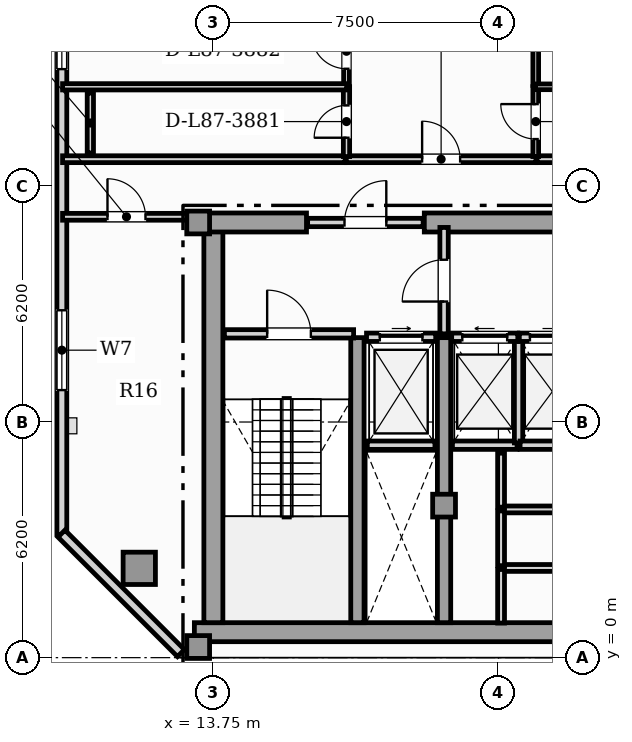
"""IFC4 building model, lengths in metres.
Left out: names, types, materials, properties, quantities, classifications, styles, units other than length and angle.
Written with IfcOpenShell. Run it as: python <this file> out.ifc"""

import sys

from ifc_helpers import new_model, si_unit, direction, frame, frame_2d, origin, origin_2d, place, context, subcontext, project, spatial, rectangle, hollow_rectangle, extrude, element, fill, save


model = new_model("IFC4")
c1 = context("Model", 3, precision=1e-05, world=origin(), true_north=direction((0.0, 1.0)))
c2 = subcontext(c1, "Body", "Model", "MODEL_VIEW")
j1 = project(units=[si_unit("LENGTHUNIT", "METRE"), si_unit("PLANEANGLEUNIT", "RADIAN")], contexts=[c1])
p1 = place(None, origin())
s1 = spatial("IfcSite", under=j1, at=p1, CompositionType="ELEMENT")
p2 = place(p1, origin())
s2 = spatial("IfcBuilding", under=s1, at=p2, CompositionType="ELEMENT")
p3 = place(p2, frame((0.0, 0.0, 353.45)))
s3 = spatial("IfcBuildingStorey", under=s2, at=p3, CompositionType="ELEMENT", Elevation=353.45)
p4 = place(p3, frame((13.25, 0.67, 0.0), z_axis=(0.0, 0.0, 1.0), x_axis=(1.0, 0.0, 0.0)))
e1 = element("IfcWall", 1, at=p4, inside=s3, PredefinedType="SHEAR", context=c2, shape_type="SweptSolid", body=[
    extrude(rectangle(XDim=31.0, YDim=0.5, at=frame_2d((15.5, 0.0))), origin(), (0.0, 0.0, 1.0), 4.14),
])
p5 = place(p3, frame((13.75, 0.92, 0.0), z_axis=(0.0, 0.0, 1.0), x_axis=(0.0, 1.0, 0.0)))
e2 = element("IfcWall", 2, at=p5, inside=s3, PredefinedType="SHEAR", context=c2, shape_type="SweptSolid", body=[
    extrude(rectangle(XDim=10.53, YDim=0.5, at=frame_2d((5.265, 0.0))), origin(), (0.0, 0.0, 1.0), 4.14),
])
p6 = place(p3, frame((13.25, 11.45, 0.0), z_axis=(0.0, 0.0, 1.0), x_axis=(1.0, 0.0, 0.0)))
e3 = element("IfcWall", 3, at=p6, inside=s3, PredefinedType="SHEAR", context=c2, shape_type="SweptSolid", body=[
    extrude(rectangle(XDim=2.95, YDim=0.5, at=frame_2d((1.475, 0.0))), origin(), (0.0, 0.0, 1.0), 4.14),
])
p7 = place(p3, frame((19.3, 11.45, 0.0), z_axis=(0.0, 0.0, 1.0), x_axis=(1.0, 0.0, 0.0)))
e4 = element("IfcWall", 4, at=p7, inside=s3, PredefinedType="SHEAR", context=c2, shape_type="SweptSolid", body=[
    extrude(rectangle(XDim=7.3, YDim=0.5, at=frame_2d((3.65, 0.0))), origin(), (0.0, 0.0, 1.0), 4.14),
])
for number, where, z_axis, x_axis in (
    (5, (17.54, 0.92, 0.0), (0.0, 0.0, 1.0), (0.0, 1.0, 0.0)),
    (6, (19.82, 0.92, 0.0), (0.0, 0.0, 1.0), (0.0, 1.0, 0.0)),
):
    element("IfcWall", number, at=place(p3, frame(where, z_axis=z_axis, x_axis=x_axis)), inside=s3, PredefinedType="SHEAR", context=c2, shape_type="SweptSolid", body=[
        extrude(rectangle(XDim=7.5, YDim=0.35, at=frame_2d((3.75, 0.0))), origin(), (0.0, 0.0, 1.0), 4.14),
    ])
for number, where, z_axis, x_axis in (
    (7, (13.35, 0.28, 0.0), (0.0, 0.0, 1.0), (1.0, 0.0, 0.0)),
    (8, (13.35, 11.45, 0.0), (0.0, 0.0, 1.0), (1.0, 0.0, 0.0)),
    (9, (19.82, 4.0, 0.0), (0.0, 0.0, 1.0), (1.0, 0.0, 0.0)),
):
    element("IfcColumn", number, at=place(p3, frame(where, z_axis=z_axis, x_axis=x_axis)), inside=s3, PredefinedType="COLUMN", context=c2, shape_type="SweptSolid", body=[
        extrude(rectangle(XDim=0.6, YDim=0.6, at=origin_2d()), origin(), (0.0, 0.0, 1.0), 4.4),
    ])
p8 = place(p3, frame((11.8, 2.35, 0.0), z_axis=(0.0, 0.0, 1.0), x_axis=(1.0, 0.0, 0.0)))
e10 = element("IfcColumn", 10, at=p8, inside=s3, PredefinedType="USERDEFINED", context=c2, shape_type="SweptSolid", body=[
    extrude(hollow_rectangle(XDim=0.85, YDim=0.85, WallThickness=0.05, at=origin_2d()), origin(), (0.0, 0.0, 1.0), 4.4),
])
p9 = place(p3, frame((9.763, 27.791, 0.0), z_axis=(0.0, 0.0, 1.0), x_axis=(0.0, -1.0, 0.0)))
e11 = element("IfcWall", 11, at=p9, inside=s3, PredefinedType="SOLIDWALL", context=c2, shape_type="SweptSolid", body=[
    extrude(rectangle(XDim=24.551, YDim=0.26, at=frame_2d((12.276, 0.0))), origin(), (0.0, 0.0, 1.0), 4.14),
])
p10 = place(p9, frame((18.651, 0.0, 0.85)))
e12 = element("IfcOpeningElement", 12, at=p10, cuts=e11, PredefinedType="OPENING", context=c2, shape_type="SweptSolid", body=[
    extrude(rectangle(XDim=2.1, YDim=2.05, at=frame_2d((1.05, 1.025))), frame((0.0, 0.14, 0.0), z_axis=(0.0, -1.0, 0.0), x_axis=(1.0, 0.0, 0.0)), (0.0, 0.0, 1.0), 0.28),
])
p11 = place(p9, frame((2.83, 0.0, 0.95)))
e13 = element("IfcOpeningElement", 13, at=p11, cuts=e11, PredefinedType="OPENING", context=c2, shape_type="SweptSolid", body=[
    extrude(rectangle(XDim=0.9, YDim=1.5, at=frame_2d((0.45, 0.75))), frame((0.0, 0.14, 0.0), z_axis=(0.0, -1.0, 0.0), x_axis=(1.0, 0.0, 0.0)), (0.0, 0.0, 1.0), 0.28),
])
p12 = place(p9, frame((11.406, 0.0, 0.95)))
e14 = element("IfcOpeningElement", 14, at=p12, cuts=e11, PredefinedType="OPENING", context=c2, shape_type="SweptSolid", body=[
    extrude(rectangle(XDim=0.9, YDim=1.5, at=frame_2d((0.45, 0.75))), frame((0.0, 0.14, 0.0), z_axis=(0.0, -1.0, 0.0), x_axis=(1.0, 0.0, 0.0)), (0.0, 0.0, 1.0), 0.28),
])
p13 = place(p9, frame((6.661, 0.0, 0.88)))
e15 = element("IfcOpeningElement", 15, at=p13, cuts=e11, PredefinedType="OPENING", context=c2, shape_type="SweptSolid", body=[
    extrude(rectangle(XDim=1.65, YDim=2.0, at=frame_2d((0.825, 1.0))), frame((0.0, 0.14, 0.0), z_axis=(0.0, -1.0, 0.0), x_axis=(1.0, 0.0, 0.0)), (0.0, 0.0, 1.0), 0.28),
])
p14 = place(p3, frame((9.753, 3.264, 0.0), z_axis=(0.0, 0.0, 1.0), x_axis=(0.707106781187, -0.707106781187, 0.0)))
e16 = element("IfcWall", 16, at=p14, inside=s3, PredefinedType="SOLIDWALL", context=c2, shape_type="SweptSolid", body=[
    extrude(rectangle(XDim=4.446, YDim=0.26, at=frame_2d((2.223, 0.0))), origin(), (0.0, 0.0, 1.0), 4.14),
])
p15 = place(p3, frame((17.8, 5.59, 0.0), z_axis=(0.0, 0.0, 1.0), x_axis=(1.0, 0.0, 0.0)))
e17 = element("IfcWall", 17, at=p15, inside=s3, PredefinedType="SOLIDWALL", context=c2, shape_type="SweptSolid", body=[
    extrude(rectangle(XDim=1.78, YDim=0.22, at=frame_2d((0.89, 0.0))), origin(), (0.0, 0.0, 1.0), 4.14),
])
p16 = place(p3, frame((17.78, 8.43, 0.0), z_axis=(0.0, 0.0, 1.0), x_axis=(1.0, 0.0, 0.0)))
e18 = element("IfcWall", 18, at=p16, inside=s3, PredefinedType="SOLIDWALL", context=c2, shape_type="SweptSolid", body=[
    extrude(rectangle(XDim=1.82, YDim=0.22, at=frame_2d((0.91, 0.0))), origin(), (0.0, 0.0, 1.0), 4.14),
])
p17 = place(p16, frame((0.35, 0.0, 0.0)))
e19 = element("IfcOpeningElement", 19, at=p17, cuts=e18, PredefinedType="OPENING", context=c2, shape_type="SweptSolid", body=[
    extrude(rectangle(XDim=1.12, YDim=2.25, at=frame_2d((0.56, 1.125))), frame((0.0, 0.12, 0.0), z_axis=(0.0, -1.0, 0.0), x_axis=(1.0, 0.0, 0.0)), (0.0, 0.0, 1.0), 0.24),
])
p18 = place(p3, frame((20.04, 5.59, 0.0), z_axis=(0.0, 0.0, 1.0), x_axis=(1.0, 0.0, 0.0)))
e20 = element("IfcWall", 20, at=p18, inside=s3, PredefinedType="SOLIDWALL", context=c2, shape_type="SweptSolid", body=[
    extrude(rectangle(XDim=1.7, YDim=0.22, at=frame_2d((0.85, 0.0))), origin(), (0.0, 0.0, 1.0), 4.14),
])
p19 = place(p3, frame((21.78, 5.65, 0.0), z_axis=(0.0, 0.0, 1.0), x_axis=(0.0, 1.0, 0.0)))
e21 = element("IfcWall", 21, at=p19, inside=s3, PredefinedType="SOLIDWALL", context=c2, shape_type="SweptSolid", body=[
    extrude(rectangle(XDim=2.7, YDim=0.22, at=frame_2d((1.35, 0.0))), origin(), (0.0, 0.0, 1.0), 4.14),
])
p20 = place(p3, frame((20.02, 8.43, 0.0), z_axis=(0.0, 0.0, 1.0), x_axis=(1.0, 0.0, 0.0)))
e22 = element("IfcWall", 22, at=p20, inside=s3, PredefinedType="SOLIDWALL", context=c2, shape_type="SweptSolid", body=[
    extrude(rectangle(XDim=1.74, YDim=0.22, at=frame_2d((0.87, 0.0))), origin(), (0.0, 0.0, 1.0), 4.14),
])
p21 = place(p20, frame((0.28, 0.0, 0.0)))
e23 = element("IfcOpeningElement", 23, at=p21, cuts=e22, PredefinedType="OPENING", context=c2, shape_type="SweptSolid", body=[
    extrude(rectangle(XDim=1.18, YDim=2.2, at=frame_2d((0.59, 1.1))), frame((0.0, 0.12, 0.0), z_axis=(0.0, -1.0, 0.0), x_axis=(1.0, 0.0, 0.0)), (0.0, 0.0, 1.0), 0.24),
])
p22 = place(p3, frame((21.82, 5.59, 0.0), z_axis=(0.0, 0.0, 1.0), x_axis=(1.0, 0.0, 0.0)))
e24 = element("IfcWall", 24, at=p22, inside=s3, PredefinedType="SOLIDWALL", context=c2, shape_type="SweptSolid", body=[
    extrude(rectangle(XDim=1.7, YDim=0.22, at=frame_2d((0.85, 0.0))), origin(), (0.0, 0.0, 1.0), 4.14),
])
p23 = place(p3, frame((21.8, 8.43, 0.0), z_axis=(0.0, 0.0, 1.0), x_axis=(1.0, 0.0, 0.0)))
e25 = element("IfcWall", 25, at=p23, inside=s3, PredefinedType="SOLIDWALL", context=c2, shape_type="SweptSolid", body=[
    extrude(rectangle(XDim=1.74, YDim=0.22, at=frame_2d((0.87, 0.0))), origin(), (0.0, 0.0, 1.0), 4.14),
])
p24 = place(p23, frame((0.28, 0.0, 0.0)))
e26 = element("IfcOpeningElement", 26, at=p24, cuts=e25, PredefinedType="OPENING", context=c2, shape_type="SweptSolid", body=[
    extrude(rectangle(XDim=1.18, YDim=2.2, at=frame_2d((0.59, 1.1))), frame((0.0, 0.12, 0.0), z_axis=(0.0, -1.0, 0.0), x_axis=(1.0, 0.0, 0.0)), (0.0, 0.0, 1.0), 0.24),
])
p25 = place(p3, frame((14.04, 8.52, 0.0), z_axis=(0.0, 0.0, 1.0), x_axis=(1.0, 0.0, 0.0)))
e27 = element("IfcWall", 27, at=p25, inside=s3, PredefinedType="SOLIDWALL", context=c2, shape_type="SweptSolid", body=[
    extrude(rectangle(XDim=3.4, YDim=0.22, at=frame_2d((1.7, 0.0))), origin(), (0.0, 0.0, 1.0), 4.14),
])
p26 = place(p25, frame((1.125, 0.0, 0.0)))
e28 = element("IfcOpeningElement", 28, at=p26, cuts=e27, PredefinedType="OPENING", context=c2, shape_type="SweptSolid", body=[
    extrude(rectangle(XDim=1.15, YDim=2.2, at=frame_2d((0.575, 1.1))), frame((0.0, 0.12, 0.0), z_axis=(0.0, -1.0, 0.0), x_axis=(1.0, 0.0, 0.0)), (0.0, 0.0, 1.0), 0.24),
])
p27 = place(p3, frame((19.82, 8.52, 0.0), z_axis=(0.0, 0.0, 1.0), x_axis=(0.0, 1.0, 0.0)))
e29 = element("IfcWall", 29, at=p27, inside=s3, PredefinedType="SOLIDWALL", context=c2, shape_type="SweptSolid", body=[
    extrude(rectangle(XDim=2.8, YDim=0.22, at=frame_2d((1.4, 0.0))), origin(), (0.0, 0.0, 1.0), 3.595),
])
p28 = place(p27, frame((0.85, 0.0, 0.0)))
e30 = element("IfcOpeningElement", 30, at=p28, cuts=e29, PredefinedType="OPENING", context=c2, shape_type="SweptSolid", body=[
    extrude(rectangle(XDim=1.1, YDim=2.2, at=frame_2d((0.55, 1.1))), frame((0.0, 0.12, 0.0), z_axis=(0.0, -1.0, 0.0), x_axis=(1.0, 0.0, 0.0)), (0.0, 0.0, 1.0), 0.24),
])
p29 = place(p3, frame((16.23, 11.45, 0.0), z_axis=(0.0, 0.0, 1.0), x_axis=(1.0, 0.0, 0.0)))
e31 = element("IfcWall", 31, at=p29, inside=s3, PredefinedType="SOLIDWALL", context=c2, shape_type="SweptSolid", body=[
    extrude(rectangle(XDim=3.04, YDim=0.22, at=frame_2d((1.52, 0.0))), origin(), (0.0, 0.0, 1.0), 4.14),
])
p30 = place(p29, frame((0.97, 0.0, 0.0)))
e32 = element("IfcOpeningElement", 32, at=p30, cuts=e31, PredefinedType="OPENING", context=c2, shape_type="SweptSolid", body=[
    extrude(rectangle(XDim=1.1, YDim=2.2, at=frame_2d((0.55, 1.1))), frame((0.0, 0.12, 0.0), z_axis=(0.0, -1.0, 0.0), x_axis=(1.0, 0.0, 0.0)), (0.0, 0.0, 1.0), 0.24),
])
p31 = place(p3, frame((21.36, 2.36, 0.0), z_axis=(0.0, 0.0, 1.0), x_axis=(1.0, 0.0, 0.0)))
e33 = element("IfcWall", 33, at=p31, inside=s3, PredefinedType="PARTITIONING", context=c2, shape_type="SweptSolid", body=[
    extrude(rectangle(XDim=3.94, YDim=0.18, at=frame_2d((1.97, 0.0))), origin(), (0.0, 0.0, 1.0), 4.14),
])
p32 = place(p3, frame((21.32, 0.91, 0.0), z_axis=(0.0, 0.0, 1.0), x_axis=(0.0, 1.0, 0.0)))
e34 = element("IfcWall", 34, at=p32, inside=s3, PredefinedType="PARTITIONING", context=c2, shape_type="SweptSolid", body=[
    extrude(rectangle(XDim=1.41, YDim=0.18, at=frame_2d((0.705, 0.0))), origin(), (0.0, 0.0, 1.0), 4.14),
])
p33 = place(p3, frame((21.36, 3.9, 0.0), z_axis=(0.0, 0.0, 1.0), x_axis=(1.0, 0.0, 0.0)))
e35 = element("IfcWall", 35, at=p33, inside=s3, PredefinedType="PARTITIONING", context=c2, shape_type="SweptSolid", body=[
    extrude(rectangle(XDim=3.94, YDim=0.18, at=frame_2d((1.97, 0.0))), origin(), (0.0, 0.0, 1.0), 4.14),
])
p34 = place(p3, frame((21.32, 2.42, 0.0), z_axis=(0.0, 0.0, 1.0), x_axis=(0.0, 1.0, 0.0)))
e36 = element("IfcWall", 36, at=p34, inside=s3, PredefinedType="PARTITIONING", context=c2, shape_type="SweptSolid", body=[
    extrude(rectangle(XDim=1.44, YDim=0.18, at=frame_2d((0.72, 0.0))), origin(), (0.0, 0.0, 1.0), 4.14),
])
p35 = place(p3, frame((21.32, 3.96, 0.0), z_axis=(0.0, 0.0, 1.0), x_axis=(0.0, 1.0, 0.0)))
e37 = element("IfcWall", 37, at=p35, inside=s3, PredefinedType="PARTITIONING", context=c2, shape_type="SweptSolid", body=[
    extrude(rectangle(XDim=1.42, YDim=0.18, at=frame_2d((0.71, 0.0))), origin(), (0.0, 0.0, 1.0), 4.14),
])
p36 = place(p3, frame((9.782, 11.6, 0.0), z_axis=(0.0, 0.0, 1.0), x_axis=(1.0, 0.0, 0.0)))
e38 = element("IfcWall", 38, at=p36, inside=s3, PredefinedType="PARTITIONING", context=c2, shape_type="SweptSolid", body=[
    extrude(rectangle(XDim=3.363, YDim=0.18, at=frame_2d((1.681, 0.0))), origin(), (0.0, 0.0, 1.0), 4.14),
])
p37 = place(p36, frame((1.181, 0.0, 0.0)))
e39 = element("IfcOpeningElement", 39, at=p37, cuts=e38, PredefinedType="OPENING", context=c2, shape_type="SweptSolid", body=[
    extrude(rectangle(XDim=1.0, YDim=2.15, at=frame_2d((0.5, 1.075))), frame((0.0, 0.1, 0.0), z_axis=(0.0, -1.0, 0.0), x_axis=(1.0, 0.0, 0.0)), (0.0, 0.0, 1.0), 0.2),
])
p38 = place(p3, frame((17.248, 13.115, 0.0), z_axis=(0.0, 0.0, 1.0), x_axis=(1.0, 0.0, 0.0)))
e40 = element("IfcWall", 40, at=p38, inside=s3, PredefinedType="PARTITIONING", context=c2, shape_type="SweptSolid", body=[
    extrude(rectangle(XDim=4.99, YDim=0.18, at=frame_2d((2.495, 0.0))), origin(), (0.0, 0.0, 1.0), 4.14),
])
p39 = place(p38, frame((1.995, 0.0, 0.0)))
e41 = element("IfcOpeningElement", 41, at=p39, cuts=e40, PredefinedType="OPENING", context=c2, shape_type="SweptSolid", body=[
    extrude(rectangle(XDim=1.0, YDim=2.15, at=frame_2d((0.5, 1.075))), frame((0.0, 0.1, 0.0), z_axis=(0.0, -1.0, 0.0), x_axis=(1.0, 0.0, 0.0)), (0.0, 0.0, 1.0), 0.2),
])
p40 = place(p3, frame((9.782, 13.115, 0.0), z_axis=(0.0, 0.0, 1.0), x_axis=(1.0, 0.0, 0.0)))
e42 = element("IfcWall", 42, at=p40, inside=s3, PredefinedType="PARTITIONING", context=c2, shape_type="SweptSolid", body=[
    extrude(rectangle(XDim=7.435, YDim=0.18, at=frame_2d((3.718, 0.0))), origin(), (0.0, 0.0, 1.0), 4.14),
])
p41 = place(p3, frame((22.268, 13.115, 0.0), z_axis=(0.0, 0.0, 1.0), x_axis=(1.0, 0.0, 0.0)))
e43 = element("IfcWall", 43, at=p41, inside=s3, PredefinedType="PARTITIONING", context=c2, shape_type="SweptSolid", body=[
    extrude(rectangle(XDim=6.8, YDim=0.18, at=frame_2d((3.4, 0.0))), origin(), (0.0, 0.0, 1.0), 4.14),
])
p42 = place(p3, frame((17.252, 13.185, 0.0), z_axis=(0.0, 0.0, 1.0), x_axis=(0.0, 1.0, 0.0)))
e44 = element("IfcWall", 44, at=p42, inside=s3, PredefinedType="PLUMBINGWALL", context=c2, shape_type="SweptSolid", body=[
    extrude(rectangle(XDim=1.84, YDim=0.165, at=frame_2d((0.92, 0.0))), origin(), (0.0, 0.0, 1.0), 4.14),
])
p43 = place(p42, frame((0.495, 0.0, 0.0)))
e45 = element("IfcOpeningElement", 45, at=p43, cuts=e44, PredefinedType="OPENING", context=c2, shape_type="SweptSolid", body=[
    extrude(rectangle(XDim=0.85, YDim=2.1, at=frame_2d((0.425, 1.05))), frame((0.0, 0.093, 0.0), z_axis=(0.0, -1.0, 0.0), x_axis=(1.0, 0.0, 0.0)), (0.0, 0.0, 1.0), 0.185),
])
p44 = place(p3, frame((17.252, 15.055, 0.0), z_axis=(0.0, 0.0, 1.0), x_axis=(0.0, 1.0, 0.0)))
e46 = element("IfcWall", 46, at=p44, inside=s3, PredefinedType="PARTITIONING", context=c2, shape_type="SweptSolid", body=[
    extrude(rectangle(XDim=1.8, YDim=0.15, at=frame_2d((0.9, 0.0))), origin(), (0.0, 0.0, 1.0), 4.14),
])
p45 = place(p44, frame((0.44, 0.0, 0.0)))
e47 = element("IfcOpeningElement", 47, at=p45, cuts=e46, PredefinedType="OPENING", context=c2, shape_type="SweptSolid", body=[
    extrude(rectangle(XDim=0.92, YDim=2.1, at=frame_2d((0.46, 1.05))), frame((0.0, 0.085, 0.0), z_axis=(0.0, -1.0, 0.0), x_axis=(1.0, 0.0, 0.0)), (0.0, 0.0, 1.0), 0.17),
])
p46 = place(p3, frame((22.232, 13.185, 0.0), z_axis=(0.0, 0.0, 1.0), x_axis=(0.0, 1.0, 0.0)))
e48 = element("IfcWall", 48, at=p46, inside=s3, PredefinedType="PARTITIONING", context=c2, shape_type="SweptSolid", body=[
    extrude(rectangle(XDim=1.84, YDim=0.15, at=frame_2d((0.92, 0.0))), origin(), (0.0, 0.0, 1.0), 4.14),
])
p47 = place(p46, frame((0.46, 0.0, 0.0)))
e49 = element("IfcOpeningElement", 49, at=p47, cuts=e48, PredefinedType="OPENING", context=c2, shape_type="SweptSolid", body=[
    extrude(rectangle(XDim=0.92, YDim=2.1, at=frame_2d((0.46, 1.05))), frame((0.0, 0.085, 0.0), z_axis=(0.0, -1.0, 0.0), x_axis=(1.0, 0.0, 0.0)), (0.0, 0.0, 1.0), 0.17),
])
p48 = place(p3, frame((22.232, 15.055, 0.0), z_axis=(0.0, 0.0, 1.0), x_axis=(0.0, 1.0, 0.0)))
e50 = element("IfcWall", 50, at=p48, inside=s3, PredefinedType="PARTITIONING", context=c2, shape_type="SweptSolid", body=[
    extrude(rectangle(XDim=3.124, YDim=0.15, at=frame_2d((1.562, 0.0))), origin(), (0.0, 0.0, 1.0), 4.14),
])
p49 = place(p48, frame((1.102, 0.0, 0.0)))
e51 = element("IfcOpeningElement", 51, at=p49, cuts=e50, PredefinedType="OPENING", context=c2, shape_type="SweptSolid", body=[
    extrude(rectangle(XDim=0.92, YDim=2.1, at=frame_2d((0.46, 1.05))), frame((0.0, 0.085, 0.0), z_axis=(0.0, -1.0, 0.0), x_axis=(1.0, 0.0, 0.0)), (0.0, 0.0, 1.0), 0.17),
])
p50 = place(p3, frame((9.782, 15.02, 0.0), z_axis=(0.0, 0.0, 1.0), x_axis=(1.0, 0.0, 0.0)))
e52 = element("IfcWall", 52, at=p50, inside=s3, PredefinedType="PLUMBINGWALL", context=c2, shape_type="SweptSolid", body=[
    extrude(rectangle(XDim=7.475, YDim=0.165, at=frame_2d((3.738, 0.0))), origin(), (0.0, 0.0, 1.0), 4.14),
])
p51 = place(p3, frame((22.228, 15.02, 0.0), z_axis=(0.0, 0.0, 1.0), x_axis=(1.0, 0.0, 0.0)))
e53 = element("IfcWall", 53, at=p51, inside=s3, PredefinedType="PARTITIONING", context=c2, shape_type="SweptSolid", body=[
    extrude(rectangle(XDim=6.84, YDim=0.15, at=frame_2d((3.42, 0.0))), origin(), (0.0, 0.0, 1.0), 4.14),
])
p52 = place(p3, frame((10.513, 13.28, 0.0), z_axis=(0.0, 0.0, 1.0), x_axis=(0.0, 1.0, 0.0)))
e54 = element("IfcWall", 54, at=p52, inside=s3, PredefinedType="PLUMBINGWALL", context=c2, shape_type="SweptSolid", body=[
    extrude(rectangle(XDim=1.575, YDim=0.165, at=frame_2d((0.788, 0.0))), origin(), (0.0, 0.0, 1.0), 4.14),
])
p53 = place(p10, origin())
e55 = element("IfcWindow", 55, at=p53, inside=s3, PartitioningType="SINGLE_PANEL", PredefinedType="WINDOW", context=c2, shape_type="SweptSolid", body=[
    extrude(rectangle(XDim=2.1, YDim=2.05, at=frame_2d((1.05, 1.025))), frame((0.0, 0.03, 0.0), z_axis=(0.0, -1.0, 0.0), x_axis=(1.0, 0.0, 0.0)), (0.0, 0.0, 1.0), 0.06),
])
fill(e12, e55)
p54 = place(p12, origin())
e56 = element("IfcWindow", 56, at=p54, inside=s3, PartitioningType="SINGLE_PANEL", PredefinedType="WINDOW", context=c2, shape_type="SweptSolid", body=[
    extrude(rectangle(XDim=0.9, YDim=1.5, at=frame_2d((0.45, 0.75))), frame((0.0, 0.03, 0.0), z_axis=(0.0, -1.0, 0.0), x_axis=(1.0, 0.0, 0.0)), (0.0, 0.0, 1.0), 0.06),
])
fill(e14, e56)
p55 = place(p17, origin())
e57 = element("IfcDoor", 57, at=p55, inside=s3, OperationType="SLIDING_TO_RIGHT", PredefinedType="DOOR", context=c2, shape_type="SweptSolid", body=[
    extrude(rectangle(XDim=1.12, YDim=2.25, at=frame_2d((0.56, 1.125))), frame((0.0, 0.025, 0.0), z_axis=(0.0, -1.0, 0.0), x_axis=(1.0, 0.0, 0.0)), (0.0, 0.0, 1.0), 0.05),
])
fill(e19, e57)
p56 = place(p21, origin())
e58 = element("IfcDoor", 58, at=p56, inside=s3, OperationType="SLIDING_TO_LEFT", PredefinedType="DOOR", context=c2, shape_type="SweptSolid", body=[
    extrude(rectangle(XDim=1.18, YDim=2.2, at=frame_2d((0.59, 1.1))), frame((0.0, 0.025, 0.0), z_axis=(0.0, -1.0, 0.0), x_axis=(1.0, 0.0, 0.0)), (0.0, 0.0, 1.0), 0.05),
])
fill(e23, e58)
p57 = place(p24, origin())
e59 = element("IfcDoor", 59, at=p57, inside=s3, OperationType="SLIDING_TO_RIGHT", PredefinedType="DOOR", context=c2, shape_type="SweptSolid", body=[
    extrude(rectangle(XDim=1.18, YDim=2.2, at=frame_2d((0.59, 1.1))), frame((0.0, 0.025, 0.0), z_axis=(0.0, -1.0, 0.0), x_axis=(1.0, 0.0, 0.0)), (0.0, 0.0, 1.0), 0.05),
])
fill(e26, e59)
p58 = place(p26, origin())
e60 = element("IfcDoor", 60, at=p58, inside=s3, OperationType="SINGLE_SWING_LEFT", PredefinedType="DOOR", context=c2, shape_type="SweptSolid", body=[
    extrude(rectangle(XDim=1.15, YDim=2.2, at=frame_2d((0.575, 1.1))), frame((0.0, 0.025, 0.0), z_axis=(0.0, -1.0, 0.0), x_axis=(1.0, 0.0, 0.0)), (0.0, 0.0, 1.0), 0.05),
])
fill(e28, e60)
p59 = place(p28, origin())
e61 = element("IfcDoor", 61, at=p59, inside=s3, OperationType="SINGLE_SWING_LEFT", PredefinedType="DOOR", context=c2, shape_type="SweptSolid", body=[
    extrude(rectangle(XDim=1.1, YDim=2.2, at=frame_2d((0.55, 1.1))), frame((0.0, 0.025, 0.0), z_axis=(0.0, -1.0, 0.0), x_axis=(1.0, 0.0, 0.0)), (0.0, 0.0, 1.0), 0.05),
])
fill(e30, e61)
p60 = place(p30, origin())
e62 = element("IfcDoor", 62, at=p60, inside=s3, OperationType="SINGLE_SWING_RIGHT", PredefinedType="DOOR", context=c2, shape_type="SweptSolid", body=[
    extrude(rectangle(XDim=1.1, YDim=2.2, at=frame_2d((0.55, 1.1))), frame((0.0, 0.025, 0.0), z_axis=(0.0, -1.0, 0.0), x_axis=(1.0, 0.0, 0.0)), (0.0, 0.0, 1.0), 0.05),
])
fill(e32, e62)
p61 = place(p37, origin())
e63 = element("IfcDoor", 63, at=p61, inside=s3, OperationType="SINGLE_SWING_LEFT", PredefinedType="DOOR", context=c2, shape_type="SweptSolid", body=[
    extrude(rectangle(XDim=1.0, YDim=2.15, at=frame_2d((0.5, 1.075))), frame((0.0, 0.025, 0.0), z_axis=(0.0, -1.0, 0.0), x_axis=(1.0, 0.0, 0.0)), (0.0, 0.0, 1.0), 0.05),
])
fill(e39, e63)
p62 = place(p39, origin())
e64 = element("IfcDoor", 64, at=p62, inside=s3, OperationType="SINGLE_SWING_LEFT", PredefinedType="DOOR", context=c2, shape_type="SweptSolid", body=[
    extrude(rectangle(XDim=1.0, YDim=2.15, at=frame_2d((0.5, 1.075))), frame((0.0, 0.025, 0.0), z_axis=(0.0, -1.0, 0.0), x_axis=(1.0, 0.0, 0.0)), (0.0, 0.0, 1.0), 0.05),
])
fill(e41, e64)
p63 = place(p43, origin())
e65 = element("IfcDoor", 65, at=p63, inside=s3, OperationType="SINGLE_SWING_LEFT", PredefinedType="DOOR", context=c2, shape_type="SweptSolid", body=[
    extrude(rectangle(XDim=0.85, YDim=2.1, at=frame_2d((0.425, 1.05))), frame((0.0, 0.025, 0.0), z_axis=(0.0, -1.0, 0.0), x_axis=(1.0, 0.0, 0.0)), (0.0, 0.0, 1.0), 0.05),
])
fill(e45, e65)
p64 = place(p45, origin())
e66 = element("IfcDoor", 66, at=p64, inside=s3, OperationType="SINGLE_SWING_RIGHT", PredefinedType="DOOR", context=c2, shape_type="SweptSolid", body=[
    extrude(rectangle(XDim=0.92, YDim=2.1, at=frame_2d((0.46, 1.05))), frame((0.0, 0.025, 0.0), z_axis=(0.0, -1.0, 0.0), x_axis=(1.0, 0.0, 0.0)), (0.0, 0.0, 1.0), 0.05),
])
fill(e47, e66)
p65 = place(p47, origin())
e67 = element("IfcDoor", 67, at=p65, inside=s3, OperationType="SINGLE_SWING_RIGHT", PredefinedType="DOOR", context=c2, shape_type="SweptSolid", body=[
    extrude(rectangle(XDim=0.92, YDim=2.1, at=frame_2d((0.46, 1.05))), frame((0.0, 0.025, 0.0), z_axis=(0.0, -1.0, 0.0), x_axis=(1.0, 0.0, 0.0)), (0.0, 0.0, 1.0), 0.05),
])
fill(e49, e67)
save(model, sys.argv[1])
